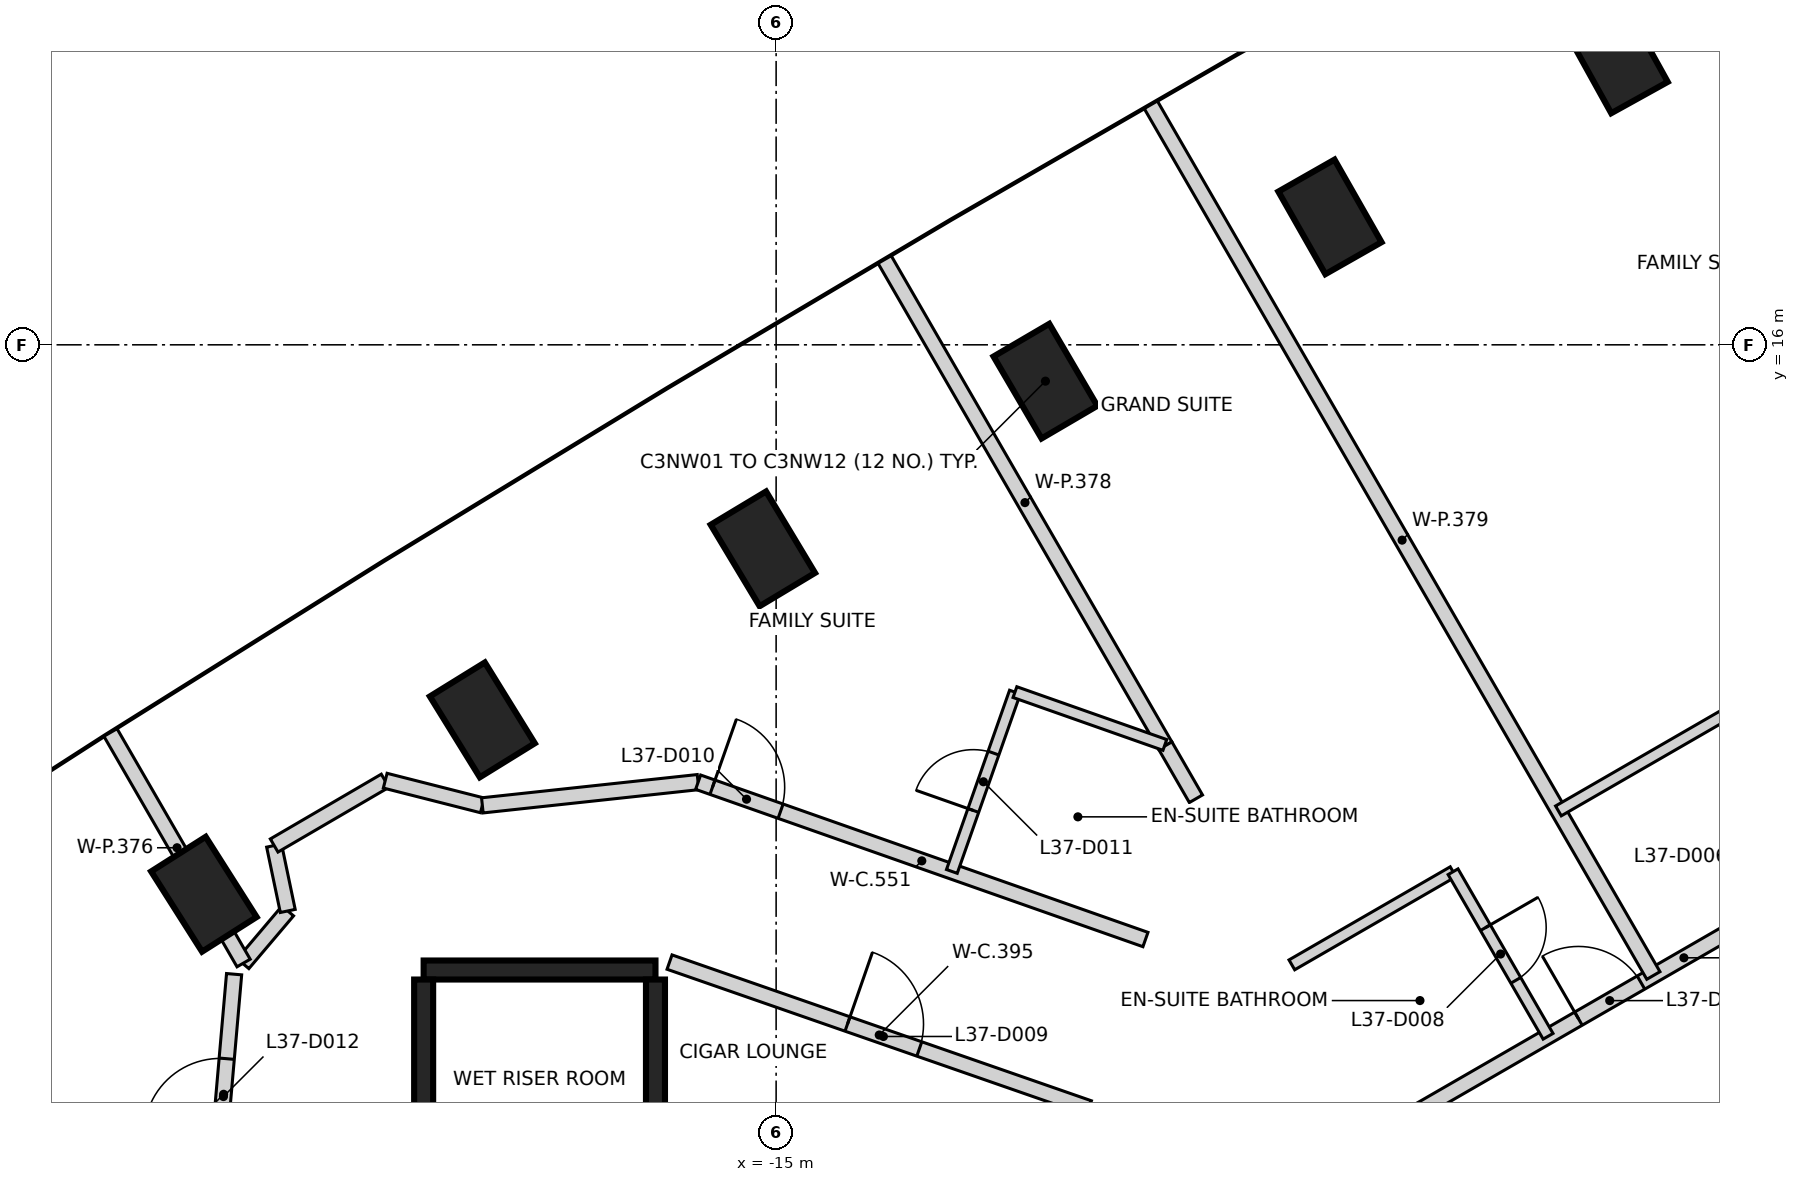
"""IFC4 building model, lengths in metres.
Left out: names, types, materials, properties, quantities, classifications, styles, units other than length and angle.
Written with IfcOpenShell. Run it as: python <this file> out.ifc"""

import sys

from ifc_helpers import new_model, si_unit, direction, frame, frame_2d, origin, origin_2d, place, context, subcontext, project, spatial, rectangle, extrude, element, fill, save


model = new_model("IFC4")
c1 = context("Model", 3, precision=1e-05, world=origin(), true_north=direction((0.0, 1.0)))
c2 = subcontext(c1, "Body", "Model", "MODEL_VIEW")
j1 = project(units=[si_unit("LENGTHUNIT", "METRE"), si_unit("PLANEANGLEUNIT", "RADIAN")], contexts=[c1])
p1 = place(None, origin())
s1 = spatial("IfcSite", under=j1, at=p1, CompositionType="ELEMENT")
p2 = place(p1, origin())
s2 = spatial("IfcBuilding", under=s1, at=p2, CompositionType="ELEMENT")
p3 = place(p2, frame((0.0, 0.0, 150.4)))
s3 = spatial("IfcBuildingStorey", under=s2, at=p3, CompositionType="ELEMENT", Elevation=150.4)
for number, where, z_axis, x_axis in (
    (1, (-3.945, 19.8, -0.4), (0.0, 0.0, 1.0), (-0.485, 0.875, 0.0)),
    (2, (-7.714, 17.683, -0.4), (0.0, 0.0, 1.0), (-0.495, 0.869, 0.0)),
    (3, (-11.457, 15.522, -0.4), (0.0, 0.0, 1.0), (-0.505, 0.863, 0.0)),
    (4, (-15.175, 13.316, -0.4), (0.0, 0.0, 1.0), (-0.515, 0.857, 0.0)),
    (5, (-18.865, 11.066, -0.4), (0.0, 0.0, 1.0), (-0.526, 0.851, 0.0)),
    (6, (-22.529, 8.772, -0.4), (0.0, 0.0, 1.0), (-0.536, 0.844, 0.0)),
):
    element("IfcColumn", number, at=place(p3, frame(where, z_axis=z_axis, x_axis=x_axis)), inside=s3, PredefinedType="COLUMN", context=c2, shape_type="SweptSolid", body=[
        extrude(rectangle(XDim=1.25, YDim=0.85, at=origin_2d()), origin(), (0.0, 0.0, 1.0), 3.6),
    ])
p4 = place(p3, frame((-19.637, 7.775, 0.0), z_axis=(0.0, 0.0, 1.0), x_axis=(1.0, 0.0, 0.0)))
e7 = element("IfcWall", 7, at=p4, inside=s3, PredefinedType="SHEAR", context=c2, shape_type="SweptSolid", body=[
    extrude(rectangle(XDim=3.05, YDim=0.25, at=frame_2d((1.525, 0.0))), origin(), (0.0, 0.0, 1.0), 3.2),
])
for number, where, z_axis, x_axis in (
    (8, (-16.587, 7.65, 0.0), (0.0, 0.0, 1.0), (0.0, -1.0, 0.0)),
    (9, (-19.637, 4.785, 0.0), (0.0, 0.0, 1.0), (0.0, 1.0, 0.0)),
):
    element("IfcWall", number, at=place(p3, frame(where, z_axis=z_axis, x_axis=x_axis)), inside=s3, PredefinedType="SHEAR", context=c2, shape_type="SweptSolid", body=[
        extrude(rectangle(XDim=2.865, YDim=0.25, at=frame_2d((1.432, 0.0))), origin(), (0.0, 0.0, 1.0), 3.2),
    ])
p5 = place(p3, frame((-22.407, 4.56, 0.0), z_axis=(0.0, 0.0, 1.0), x_axis=(0.086898645684, 0.996217157741, 0.0)))
e10 = element("IfcWall", 10, at=p5, inside=s3, PredefinedType="PARTITIONING", context=c2, shape_type="SweptSolid", body=[
    extrude(rectangle(XDim=3.172, YDim=0.2, at=frame_2d((1.586, 0.0))), origin(), (0.0, 0.0, 1.0), 3.2),
])
p6 = place(p5, frame((1.056, 0.0, 0.0)))
e11 = element("IfcOpeningElement", 11, at=p6, cuts=e10, PredefinedType="OPENING", context=c2, shape_type="SweptSolid", body=[
    extrude(rectangle(XDim=1.0, YDim=2.1, at=frame_2d((0.5, 1.05))), frame((0.0, 0.11, 0.0), z_axis=(0.0, -1.0, 0.0), x_axis=(1.0, 0.0, 0.0)), (0.0, 0.0, 1.0), 0.22),
])
p7 = place(p3, frame((-22.013, 7.858, 0.0), z_axis=(0.0, 0.0, 1.0), x_axis=(0.646315152402, 0.763070588986, 0.0)))
e12 = element("IfcWall", 12, at=p7, inside=s3, PredefinedType="PARTITIONING", context=c2, shape_type="SweptSolid", body=[
    extrude(rectangle(XDim=0.91, YDim=0.2, at=frame_2d((0.455, 0.0))), origin(), (0.0, 0.0, 1.0), 3.2),
])
p8 = place(p3, frame((-21.605, 9.412, 0.0), z_axis=(0.0, 0.0, 1.0), x_axis=(0.204764111512, -0.978811349871, 0.0)))
e13 = element("IfcWall", 13, at=p8, inside=s3, PredefinedType="PARTITIONING", context=c2, shape_type="SweptSolid", body=[
    extrude(rectangle(XDim=0.879, YDim=0.2, at=frame_2d((0.439, 0.0))), origin(), (0.0, 0.0, 1.0), 2.3),
])
p9 = place(p3, frame((-21.604, 9.413, 0.0), z_axis=(0.0, 0.0, 1.0), x_axis=(0.863736988548, 0.503942868402, 0.0)))
e14 = element("IfcWall", 14, at=p9, inside=s3, PredefinedType="PARTITIONING", context=c2, shape_type="SweptSolid", body=[
    extrude(rectangle(XDim=1.69, YDim=0.2, at=frame_2d((0.845, 0.0))), origin(), (0.0, 0.0, 1.0), 2.3),
])
p10 = place(p3, frame((-20.143, 10.266, 0.0), z_axis=(0.0, 0.0, 1.0), x_axis=(0.969121308325, -0.246584447505, 0.0)))
e15 = element("IfcWall", 15, at=p10, inside=s3, PredefinedType="PARTITIONING", context=c2, shape_type="SweptSolid", body=[
    extrude(rectangle(XDim=1.319, YDim=0.2, at=frame_2d((0.659, 0.0))), origin(), (0.0, 0.0, 1.0), 2.3),
])
p11 = place(p3, frame((-18.865, 9.941, 0.0), z_axis=(0.0, 0.0, 1.0), x_axis=(0.99423123086, 0.107257911519, 0.0)))
e16 = element("IfcWall", 16, at=p11, inside=s3, PredefinedType="PARTITIONING", context=c2, shape_type="SweptSolid", body=[
    extrude(rectangle(XDim=2.854, YDim=0.2, at=frame_2d((1.427, 0.0))), origin(), (0.0, 0.0, 1.0), 3.2),
])
p12 = place(p3, frame((-16.402, 7.879, 0.0), z_axis=(0.0, 0.0, 1.0), x_axis=(0.94449961557, -0.328512520596, 0.0)))
e17 = element("IfcWall", 17, at=p12, inside=s3, PredefinedType="PARTITIONING", context=c2, shape_type="SweptSolid", body=[
    extrude(rectangle(XDim=5.842, YDim=0.2, at=frame_2d((2.921, 0.0))), origin(), (0.0, 0.0, 1.0), 3.2),
])
p13 = place(p12, frame((2.479, 0.0, 0.0)))
e18 = element("IfcOpeningElement", 18, at=p13, cuts=e17, PredefinedType="OPENING", context=c2, shape_type="SweptSolid", body=[
    extrude(rectangle(XDim=1.0, YDim=2.1, at=frame_2d((0.5, 1.05))), frame((0.0, 0.11, 0.0), z_axis=(0.0, -1.0, 0.0), x_axis=(1.0, 0.0, 0.0)), (0.0, 0.0, 1.0), 0.22),
])
p14 = place(p3, frame((-16.026, 10.246, 0.0), z_axis=(0.0, 0.0, 1.0), x_axis=(0.943337348352, -0.331835271187, 0.0)))
e19 = element("IfcWall", 19, at=p14, inside=s3, PredefinedType="PARTITIONING", context=c2, shape_type="SweptSolid", body=[
    extrude(rectangle(XDim=6.238, YDim=0.2, at=frame_2d((3.119, 0.0))), origin(), (0.0, 0.0, 1.0), 3.2),
])
p15 = place(p14, frame((0.2, 0.0, 0.0)))
e20 = element("IfcOpeningElement", 20, at=p15, cuts=e19, PredefinedType="OPENING", context=c2, shape_type="SweptSolid", body=[
    extrude(rectangle(XDim=0.95, YDim=2.1, at=frame_2d((0.475, 1.05))), frame((0.0, 0.11, 0.0), z_axis=(0.0, -1.0, 0.0), x_axis=(1.0, 0.0, 0.0)), (0.0, 0.0, 1.0), 0.22),
])
p16 = place(p3, frame((-8.612, 2.418, 0.0), z_axis=(0.0, 0.0, 1.0), x_axis=(0.866019033094, 0.500011034197, 0.0)))
e21 = element("IfcWall", 21, at=p16, inside=s3, PredefinedType="PARTITIONING", context=c2, shape_type="SweptSolid", body=[
    extrude(rectangle(XDim=12.498, YDim=0.2, at=frame_2d((6.249, 0.0))), origin(), (0.0, 0.0, 1.0), 3.2),
])
p17 = place(p16, frame((9.346, 0.0, 0.0)))
e22 = element("IfcOpeningElement", 22, at=p17, cuts=e21, PredefinedType="OPENING", context=c2, shape_type="SweptSolid", body=[
    extrude(rectangle(XDim=0.9, YDim=2.1, at=frame_2d((0.45, 1.05))), frame((0.0, 0.11, 0.0), z_axis=(0.0, -1.0, 0.0), x_axis=(1.0, 0.0, 0.0)), (0.0, 0.0, 1.0), 0.22),
])
p18 = place(p16, frame((3.109, 0.0, 0.0)))
e23 = element("IfcOpeningElement", 23, at=p18, cuts=e21, PredefinedType="OPENING", context=c2, shape_type="SweptSolid", body=[
    extrude(rectangle(XDim=0.9, YDim=2.1, at=frame_2d((0.45, 1.05))), frame((0.0, 0.11, 0.0), z_axis=(0.0, -1.0, 0.0), x_axis=(1.0, 0.0, 0.0)), (0.0, 0.0, 1.0), 0.22),
])
p19 = place(p3, frame((-6.976, 5.674, 0.0), z_axis=(0.0, 0.0, 1.0), x_axis=(0.8661469583, 0.499789402276, 0.0)))
e24 = element("IfcWall", 24, at=p19, inside=s3, PredefinedType="PARTITIONING", context=c2, shape_type="SweptSolid", body=[
    extrude(rectangle(XDim=9.05, YDim=0.2, at=frame_2d((4.525, 0.0))), origin(), (0.0, 0.0, 1.0), 3.2),
])
p20 = place(p19, frame((7.852, 0.0, 0.0)))
e25 = element("IfcOpeningElement", 25, at=p20, cuts=e24, PredefinedType="OPENING", context=c2, shape_type="SweptSolid", body=[
    extrude(rectangle(XDim=0.95, YDim=2.1, at=frame_2d((0.475, 1.05))), frame((0.0, 0.11, 0.0), z_axis=(0.0, -1.0, 0.0), x_axis=(1.0, 0.0, 0.0)), (0.0, 0.0, 1.0), 0.22),
])
p21 = place(p19, frame((2.923, 0.0, 0.0)))
e26 = element("IfcOpeningElement", 26, at=p21, cuts=e24, PredefinedType="OPENING", context=c2, shape_type="SweptSolid", body=[
    extrude(rectangle(XDim=0.95, YDim=2.1, at=frame_2d((0.475, 1.05))), frame((0.0, 0.11, 0.0), z_axis=(0.0, -1.0, 0.0), x_axis=(1.0, 0.0, 0.0)), (0.0, 0.0, 1.0), 0.22),
])
p22 = place(p3, frame((-23.758, 10.9, 0.0), z_axis=(0.0, 0.0, 1.0), x_axis=(0.500112665219, -0.865960346718, 0.0)))
e27 = element("IfcWall", 27, at=p22, inside=s3, PredefinedType="PARTITIONING", context=c2, shape_type="SweptSolid", body=[
    extrude(rectangle(XDim=3.502, YDim=0.2, at=frame_2d((1.751, 0.0))), origin(), (0.0, 0.0, 1.0), 3.2),
])
p23 = place(p3, frame((-13.573, 17.122, 0.0), z_axis=(0.0, 0.0, 1.0), x_axis=(0.49998952864, -0.866031449343, 0.0)))
e28 = element("IfcWall", 28, at=p23, inside=s3, PredefinedType="PARTITIONING", context=c2, shape_type="SweptSolid", body=[
    extrude(rectangle(XDim=7.385, YDim=0.2, at=frame_2d((3.693, 0.0))), origin(), (0.0, 0.0, 1.0), 2.3),
])
p24 = place(p3, frame((-10.071, 19.158, 0.0), z_axis=(0.0, 0.0, 1.0), x_axis=(0.499905140254, -0.866080164158, 0.0)))
e29 = element("IfcWall", 29, at=p24, inside=s3, PredefinedType="PARTITIONING", context=c2, shape_type="SweptSolid", body=[
    extrude(rectangle(XDim=13.227, YDim=0.2, at=frame_2d((6.613, 0.0))), origin(), (0.0, 0.0, 1.0), 2.3),
])
p25 = place(p3, frame((-9.88, 10.726, 0.0), z_axis=(0.0, 0.0, 1.0), x_axis=(0.499626274598, -0.866241066754, 0.0)))
e30 = element("IfcWall", 30, at=p25, inside=s3, PredefinedType="PARTITIONING", context=c2, shape_type="SweptSolid", body=[
    extrude(rectangle(XDim=0.806, YDim=0.2, at=frame_2d((0.403, 0.0))), origin(), (0.0, 0.0, 1.0), 3.2),
])
p26 = place(p3, frame((-8.0, 0.925, 0.0), z_axis=(0.0, 0.0, 1.0), x_axis=(0.866075250037, 0.499913653818, 0.0)))
e31 = element("IfcWall", 31, at=p26, inside=s3, PredefinedType="PARTITIONING", context=c2, shape_type="SweptSolid", body=[
    extrude(rectangle(XDim=12.932, YDim=0.2, at=frame_2d((6.466, 0.0))), origin(), (0.0, 0.0, 1.0), 2.3),
])
p27 = place(p3, frame((-12.688, 9.072, 0.0), z_axis=(0.0, 0.0, 1.0), x_axis=(0.331941604797, 0.943299936926, 0.0)))
e32 = element("IfcWall", 32, at=p27, inside=s3, PredefinedType="PARTITIONING", context=c2, shape_type="SweptSolid", body=[
    extrude(rectangle(XDim=2.501, YDim=0.15, at=frame_2d((1.25, 0.0))), origin(), (0.0, 0.0, 1.0), 3.2),
])
p28 = place(p27, frame((0.85, 0.0, 0.0)))
e33 = element("IfcOpeningElement", 33, at=p28, cuts=e32, PredefinedType="OPENING", context=c2, shape_type="SweptSolid", body=[
    extrude(rectangle(XDim=0.8, YDim=2.1, at=frame_2d((0.4, 1.05))), frame((0.0, 0.085, 0.0), z_axis=(0.0, -1.0, 0.0), x_axis=(1.0, 0.0, 0.0)), (0.0, 0.0, 1.0), 0.17),
])
p29 = place(p3, frame((-11.858, 11.431, 0.0), z_axis=(0.0, 0.0, 1.0), x_axis=(0.943162669368, -0.332331429617, 0.0)))
e34 = element("IfcWall", 34, at=p29, inside=s3, PredefinedType="PARTITIONING", context=c2, shape_type="SweptSolid", body=[
    extrude(rectangle(XDim=2.091, YDim=0.15, at=frame_2d((1.045, 0.0))), origin(), (0.0, 0.0, 1.0), 3.2),
])
p30 = place(p3, frame((-8.215, 7.843, 0.0), z_axis=(0.0, 0.0, 1.0), x_axis=(0.865983065851, 0.500073324283, 0.0)))
e35 = element("IfcWall", 35, at=p30, inside=s3, PredefinedType="PARTITIONING", context=c2, shape_type="SweptSolid", body=[
    extrude(rectangle(XDim=2.449, YDim=0.15, at=frame_2d((1.225, 0.0))), origin(), (0.0, 0.0, 1.0), 3.2),
])
p31 = place(p3, frame((-6.094, 9.068, 0.0), z_axis=(0.0, 0.0, 1.0), x_axis=(0.500004234368, -0.866022959057, 0.0)))
e36 = element("IfcWall", 36, at=p31, inside=s3, PredefinedType="PARTITIONING", context=c2, shape_type="SweptSolid", body=[
    extrude(rectangle(XDim=2.5, YDim=0.15, at=frame_2d((1.25, 0.0))), origin(), (0.0, 0.0, 1.0), 3.2),
])
p32 = place(p31, frame((0.85, 0.0, 0.0)))
e37 = element("IfcOpeningElement", 37, at=p32, cuts=e36, PredefinedType="OPENING", context=c2, shape_type="SweptSolid", body=[
    extrude(rectangle(XDim=0.8, YDim=2.1, at=frame_2d((0.4, 1.05))), frame((0.0, 0.085, 0.0), z_axis=(0.0, -1.0, 0.0), x_axis=(1.0, 0.0, 0.0)), (0.0, 0.0, 1.0), 0.17),
])
p33 = place(p3, frame((-4.708, 9.868, 0.0), z_axis=(0.0, 0.0, 1.0), x_axis=(0.865950438779, 0.500129820725, 0.0)))
e38 = element("IfcWall", 38, at=p33, inside=s3, PredefinedType="PARTITIONING", context=c2, shape_type="SweptSolid", body=[
    extrude(rectangle(XDim=2.698, YDim=0.15, at=frame_2d((1.349, 0.0))), origin(), (0.0, 0.0, 1.0), 3.2),
])
p34 = place(p21, origin())
e39 = element("IfcDoor", 39, at=p34, inside=s3, OperationType="SINGLE_SWING_LEFT", PredefinedType="DOOR", context=c2, shape_type="SweptSolid", body=[
    extrude(rectangle(XDim=0.95, YDim=2.1, at=frame_2d((0.475, 1.05))), frame((0.0, 0.025, 0.0), z_axis=(0.0, -1.0, 0.0), x_axis=(1.0, 0.0, 0.0)), (0.0, 0.0, 1.0), 0.05),
])
fill(e26, e39)
p35 = place(p32, frame((0.8, 0.0, 0.0), z_axis=(0.0, 0.0, 1.0), x_axis=(-1.0, 0.0, 0.0)))
e40 = element("IfcDoor", 40, at=p35, inside=s3, OperationType="SINGLE_SWING_LEFT", PredefinedType="DOOR", context=c2, shape_type="SweptSolid", body=[
    extrude(rectangle(XDim=0.8, YDim=2.1, at=frame_2d((0.4, 1.05))), frame((0.0, 0.025, 0.0), z_axis=(0.0, -1.0, 0.0), x_axis=(1.0, 0.0, 0.0)), (0.0, 0.0, 1.0), 0.05),
])
fill(e37, e40)
p36 = place(p13, frame((1.0, 0.0, 0.0), z_axis=(0.0, 0.0, 1.0), x_axis=(-1.0, 0.0, 0.0)))
e41 = element("IfcDoor", 41, at=p36, inside=s3, OperationType="SINGLE_SWING_LEFT", PredefinedType="DOOR", context=c2, shape_type="SweptSolid", body=[
    extrude(rectangle(XDim=1.0, YDim=2.1, at=frame_2d((0.5, 1.05))), frame((0.0, 0.025, 0.0), z_axis=(0.0, -1.0, 0.0), x_axis=(1.0, 0.0, 0.0)), (0.0, 0.0, 1.0), 0.05),
])
fill(e18, e41)
p37 = place(p15, origin())
e42 = element("IfcDoor", 42, at=p37, inside=s3, OperationType="SINGLE_SWING_LEFT", PredefinedType="DOOR", context=c2, shape_type="SweptSolid", body=[
    extrude(rectangle(XDim=0.95, YDim=2.1, at=frame_2d((0.475, 1.05))), frame((0.0, 0.025, 0.0), z_axis=(0.0, -1.0, 0.0), x_axis=(1.0, 0.0, 0.0)), (0.0, 0.0, 1.0), 0.05),
])
fill(e20, e42)
p38 = place(p28, origin())
e43 = element("IfcDoor", 43, at=p38, inside=s3, OperationType="SINGLE_SWING_LEFT", PredefinedType="DOOR", context=c2, shape_type="SweptSolid", body=[
    extrude(rectangle(XDim=0.8, YDim=2.1, at=frame_2d((0.4, 1.05))), frame((0.0, 0.025, 0.0), z_axis=(0.0, -1.0, 0.0), x_axis=(1.0, 0.0, 0.0)), (0.0, 0.0, 1.0), 0.05),
])
fill(e33, e43)
p39 = place(p6, origin())
e44 = element("IfcDoor", 44, at=p39, inside=s3, OperationType="SINGLE_SWING_LEFT", PredefinedType="DOOR", context=c2, shape_type="SweptSolid", body=[
    extrude(rectangle(XDim=1.0, YDim=2.1, at=frame_2d((0.5, 1.05))), frame((0.0, 0.025, 0.0), z_axis=(0.0, -1.0, 0.0), x_axis=(1.0, 0.0, 0.0)), (0.0, 0.0, 1.0), 0.05),
])
fill(e11, e44)
save(model, sys.argv[1])
